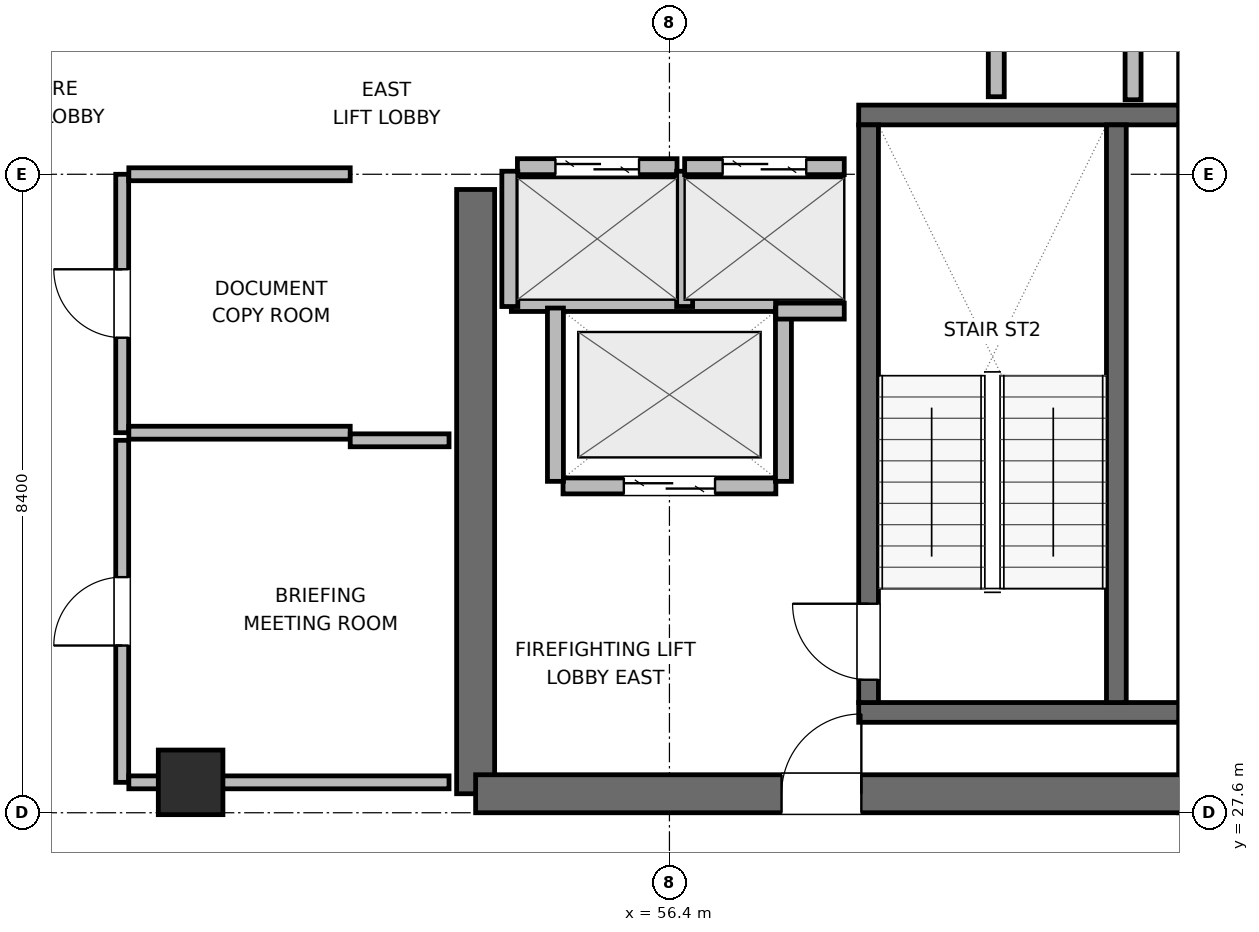
"""IFC4 building model, lengths in metres.
Left out: names, types, materials, properties, quantities, classifications, styles, units other than length and angle.
Written with IfcOpenShell. Run it as: python <this file> out.ifc"""

import sys

from ifc_helpers import new_model, si_unit, direction, frame, frame_2d, origin, origin_2d, place, context, subcontext, project, spatial, rectangle, extrude, element, fill, save


model = new_model("IFC4")
c1 = context("Model", 3, precision=1e-05, world=origin(), true_north=direction((0.0, 1.0)))
c2 = subcontext(c1, "Body", "Model", "MODEL_VIEW")
j1 = project(units=[si_unit("LENGTHUNIT", "METRE"), si_unit("PLANEANGLEUNIT", "RADIAN")], contexts=[c1])
p1 = place(None, origin())
s1 = spatial("IfcSite", under=j1, at=p1, CompositionType="ELEMENT")
p2 = place(p1, origin())
s2 = spatial("IfcBuilding", under=s1, at=p2, CompositionType="ELEMENT")
p3 = place(p2, frame((0.0, 0.0, 302.4)))
s3 = spatial("IfcBuildingStorey", under=s2, at=p3, CompositionType="ELEMENT", Elevation=302.4)
p4 = place(p3, frame((53.85, 27.85, 0.0), z_axis=(0.0, 0.0, 1.0), x_axis=(0.0, 1.0, 0.0)))
e1 = element("IfcWall", 1, at=p4, inside=s3, PredefinedType="SHEAR", context=c2, shape_type="SweptSolid", body=[
    extrude(rectangle(XDim=7.95, YDim=0.5, at=frame_2d((3.975, 0.0))), origin(), (0.0, 0.0, 1.0), 3.9),
])
p5 = place(p3, frame((63.35, 27.6, 0.0), z_axis=(0.0, 0.0, 1.0), x_axis=(0.0, 1.0, 0.0)))
e2 = element("IfcWall", 2, at=p5, inside=s3, PredefinedType="SHEAR", context=c2, shape_type="SweptSolid", body=[
    extrude(rectangle(XDim=16.8, YDim=0.5, at=frame_2d((8.4, 0.0))), origin(), (0.0, 0.0, 1.0), 3.9),
])
p6 = place(p3, frame((53.85, 27.85, 0.0), z_axis=(0.0, 0.0, 1.0), x_axis=(1.0, 0.0, 0.0)))
e3 = element("IfcWall", 3, at=p6, inside=s3, PredefinedType="SHEAR", context=c2, shape_type="SweptSolid", body=[
    extrude(rectangle(XDim=9.5, YDim=0.5, at=frame_2d((4.75, 0.0))), origin(), (0.0, 0.0, 1.0), 3.9),
])
p7 = place(p6, frame((4.025, 0.0, 0.0)))
e4 = element("IfcOpeningElement", 4, at=p7, cuts=e3, PredefinedType="OPENING", context=c2, shape_type="SweptSolid", body=[
    extrude(rectangle(XDim=1.05, YDim=2.04, at=frame_2d((0.525, 1.02))), frame((0.0, 0.26, 0.0), z_axis=(0.0, -1.0, 0.0), x_axis=(1.0, 0.0, 0.0)), (0.0, 0.0, 1.0), 0.52),
])
for number, where, z_axis, x_axis in (
    (5, (58.89, 28.92, 0.0), (0.0, 0.0, 1.0), (1.0, 0.0, 0.0)),
    (6, (58.89, 36.78, 0.0), (0.0, 0.0, 1.0), (1.0, 0.0, 0.0)),
):
    element("IfcWall", number, at=place(p3, frame(where, z_axis=z_axis, x_axis=x_axis)), inside=s3, PredefinedType="SHEAR", context=c2, shape_type="SweptSolid", body=[
        extrude(rectangle(XDim=4.21, YDim=0.26, at=frame_2d((2.105, 0.0))), origin(), (0.0, 0.0, 1.0), 3.9),
    ])
p8 = place(p3, frame((59.02, 29.05, 0.0), z_axis=(0.0, 0.0, 1.0), x_axis=(0.0, 1.0, 0.0)))
e7 = element("IfcWall", 7, at=p8, inside=s3, PredefinedType="SHEAR", context=c2, shape_type="SweptSolid", body=[
    extrude(rectangle(XDim=7.6, YDim=0.26, at=frame_2d((3.8, 0.0))), origin(), (0.0, 0.0, 1.0), 3.9),
])
p9 = place(p8, frame((0.3, 0.0, 0.0)))
e8 = element("IfcOpeningElement", 8, at=p9, cuts=e7, PredefinedType="OPENING", context=c2, shape_type="SweptSolid", body=[
    extrude(rectangle(XDim=1.0, YDim=2.04, at=frame_2d((0.5, 1.02))), frame((0.0, 0.14, 0.0), z_axis=(0.0, -1.0, 0.0), x_axis=(1.0, 0.0, 0.0)), (0.0, 0.0, 1.0), 0.28),
])
p10 = place(p3, frame((62.28, 29.05, 0.0), z_axis=(0.0, 0.0, 1.0), x_axis=(0.0, 1.0, 0.0)))
e9 = element("IfcWall", 9, at=p10, inside=s3, PredefinedType="SHEAR", context=c2, shape_type="SweptSolid", body=[
    extrude(rectangle(XDim=7.6, YDim=0.26, at=frame_2d((3.8, 0.0))), origin(), (0.0, 0.0, 1.0), 3.9),
])
p11 = place(p3, frame((50.1, 28.0, 0.0), z_axis=(0.0, 0.0, 1.0), x_axis=(1.0, 0.0, 0.0)))
e10 = element("IfcColumn", 10, at=p11, inside=s3, PredefinedType="COLUMN", context=c2, shape_type="SweptSolid", body=[
    extrude(rectangle(XDim=0.85, YDim=0.85, at=origin_2d()), origin(), (0.0, 0.0, 1.0), 3.9),
])
p12 = place(p3, frame((60.7, 37.02, 0.0), z_axis=(0.0, 0.0, 1.0), x_axis=(0.0, 1.0, 0.0)))
e11 = element("IfcWall", 11, at=p12, inside=s3, PredefinedType="PARTITIONING", context=c2, shape_type="SweptSolid", body=[
    extrude(rectangle(XDim=1.96, YDim=0.21, at=frame_2d((0.98, 0.0))), origin(), (0.0, 0.0, 1.0), 3.68),
])
p13 = place(p3, frame((62.5, 36.98, 0.0), z_axis=(0.0, 0.0, 1.0), x_axis=(0.0, 1.0, 0.0)))
e12 = element("IfcWall", 12, at=p13, inside=s3, PredefinedType="PARTITIONING", context=c2, shape_type="SweptSolid", body=[
    extrude(rectangle(XDim=2.04, YDim=0.21, at=frame_2d((1.02, 0.0))), origin(), (0.0, 0.0, 1.0), 3.68),
])
p14 = place(p3, frame((55.0, 31.9, 0.0), z_axis=(0.0, 0.0, 1.0), x_axis=(1.0, 0.0, 0.0)))
e13 = element("IfcWall", 13, at=p14, inside=s3, PredefinedType="PARTITIONING", context=c2, shape_type="SweptSolid", body=[
    extrude(rectangle(XDim=2.8, YDim=0.21, at=frame_2d((1.4, 0.0))), origin(), (0.0, 0.0, 1.0), 3.68),
])
p15 = place(p14, frame((0.8, 0.0, 0.0)))
e14 = element("IfcOpeningElement", 14, at=p15, cuts=e13, PredefinedType="OPENING", context=c2, shape_type="SweptSolid", body=[
    extrude(rectangle(XDim=1.2, YDim=2.04, at=frame_2d((0.6, 1.02))), frame((0.0, 0.115, 0.0), z_axis=(0.0, -1.0, 0.0), x_axis=(1.0, 0.0, 0.0)), (0.0, 0.0, 1.0), 0.23),
])
p16 = place(p3, frame((54.32, 34.3, 0.0), z_axis=(0.0, 0.0, 1.0), x_axis=(1.0, 0.0, 0.0)))
e15 = element("IfcWall", 15, at=p16, inside=s3, PredefinedType="PARTITIONING", context=c2, shape_type="SweptSolid", body=[
    extrude(rectangle(XDim=3.48, YDim=0.21, at=frame_2d((1.74, 0.0))), origin(), (0.0, 0.0, 1.0), 3.68),
])
for number, where, z_axis, x_axis in (
    (16, (54.9, 31.96, 0.0), (0.0, 0.0, 1.0), (0.0, 1.0, 0.0)),
    (17, (57.9, 31.96, 0.0), (0.0, 0.0, 1.0), (0.0, 1.0, 0.0)),
):
    element("IfcWall", number, at=place(p3, frame(where, z_axis=z_axis, x_axis=x_axis)), inside=s3, PredefinedType="PARTITIONING", context=c2, shape_type="SweptSolid", body=[
        extrude(rectangle(XDim=2.28, YDim=0.21, at=frame_2d((1.14, 0.0))), origin(), (0.0, 0.0, 1.0), 3.68),
    ])
p17 = place(p3, frame((54.4, 36.1, 0.0), z_axis=(0.0, 0.0, 1.0), x_axis=(1.0, 0.0, 0.0)))
e18 = element("IfcWall", 18, at=p17, inside=s3, PredefinedType="PARTITIONING", context=c2, shape_type="SweptSolid", body=[
    extrude(rectangle(XDim=2.1, YDim=0.21, at=frame_2d((1.05, 0.0))), origin(), (0.0, 0.0, 1.0), 3.68),
])
p18 = place(p17, frame((0.5, 0.0, 0.0)))
e19 = element("IfcOpeningElement", 19, at=p18, cuts=e18, PredefinedType="OPENING", context=c2, shape_type="SweptSolid", body=[
    extrude(rectangle(XDim=1.1, YDim=2.04, at=frame_2d((0.55, 1.02))), frame((0.0, 0.115, 0.0), z_axis=(0.0, -1.0, 0.0), x_axis=(1.0, 0.0, 0.0)), (0.0, 0.0, 1.0), 0.23),
])
for number, where, z_axis, x_axis in (
    (20, (54.3, 34.26, 0.0), (0.0, 0.0, 1.0), (0.0, 1.0, 0.0)),
    (21, (56.6, 34.26, 0.0), (0.0, 0.0, 1.0), (0.0, 1.0, 0.0)),
):
    element("IfcWall", number, at=place(p3, frame(where, z_axis=z_axis, x_axis=x_axis)), inside=s3, PredefinedType="PARTITIONING", context=c2, shape_type="SweptSolid", body=[
        extrude(rectangle(XDim=1.78, YDim=0.21, at=frame_2d((0.89, 0.0))), origin(), (0.0, 0.0, 1.0), 3.68),
    ])
p19 = place(p3, frame((56.6, 36.1, 0.0), z_axis=(0.0, 0.0, 1.0), x_axis=(1.0, 0.0, 0.0)))
e22 = element("IfcWall", 22, at=p19, inside=s3, PredefinedType="PARTITIONING", context=c2, shape_type="SweptSolid", body=[
    extrude(rectangle(XDim=2.1, YDim=0.21, at=frame_2d((1.05, 0.0))), origin(), (0.0, 0.0, 1.0), 3.68),
])
p20 = place(p19, frame((0.5, 0.0, 0.0)))
e23 = element("IfcOpeningElement", 23, at=p20, cuts=e22, PredefinedType="OPENING", context=c2, shape_type="SweptSolid", body=[
    extrude(rectangle(XDim=1.1, YDim=2.04, at=frame_2d((0.55, 1.02))), frame((0.0, 0.115, 0.0), z_axis=(0.0, -1.0, 0.0), x_axis=(1.0, 0.0, 0.0)), (0.0, 0.0, 1.0), 0.23),
])
p21 = place(p3, frame((57.8, 34.2, 0.0), z_axis=(0.0, 0.0, 1.0), x_axis=(1.0, 0.0, 0.0)))
e24 = element("IfcWall", 24, at=p21, inside=s3, PredefinedType="PARTITIONING", context=c2, shape_type="SweptSolid", body=[
    extrude(rectangle(XDim=0.9, YDim=0.21, at=frame_2d((0.45, 0.0))), origin(), (0.0, 0.0, 1.0), 3.68),
])
p22 = place(p3, frame((49.2, 32.6, 0.0), z_axis=(0.0, 0.0, 1.0), x_axis=(0.0, 1.0, 0.0)))
e25 = element("IfcWall", 25, at=p22, inside=s3, PredefinedType="PARTITIONING", context=c2, shape_type="SweptSolid", body=[
    extrude(rectangle(XDim=3.4, YDim=0.17, at=frame_2d((1.7, 0.0))), origin(), (0.0, 0.0, 1.0), 3.68),
])
p23 = place(p22, frame((1.25, 0.0, 0.0)))
e26 = element("IfcOpeningElement", 26, at=p23, cuts=e25, PredefinedType="OPENING", context=c2, shape_type="SweptSolid", body=[
    extrude(rectangle(XDim=0.9, YDim=2.02, at=frame_2d((0.45, 1.01))), frame((0.0, 0.095, 0.0), z_axis=(0.0, -1.0, 0.0), x_axis=(1.0, 0.0, 0.0)), (0.0, 0.0, 1.0), 0.19),
])
for number, where, z_axis, x_axis in (
    (27, (49.287, 32.6, 0.0), (0.0, 0.0, 1.0), (1.0, 0.0, 0.0)),
    (28, (49.287, 36.0, 0.0), (0.0, 0.0, 1.0), (1.0, 0.0, 0.0)),
):
    element("IfcWall", number, at=place(p3, frame(where, z_axis=z_axis, x_axis=x_axis)), inside=s3, PredefinedType="PARTITIONING", context=c2, shape_type="SweptSolid", body=[
        extrude(rectangle(XDim=2.913, YDim=0.17, at=frame_2d((1.457, 0.0))), origin(), (0.0, 0.0, 1.0), 3.68),
    ])
p24 = place(p3, frame((49.2, 28.0, 0.0), z_axis=(0.0, 0.0, 1.0), x_axis=(0.0, 1.0, 0.0)))
e29 = element("IfcWall", 29, at=p24, inside=s3, PredefinedType="PARTITIONING", context=c2, shape_type="SweptSolid", body=[
    extrude(rectangle(XDim=4.5, YDim=0.17, at=frame_2d((2.25, 0.0))), origin(), (0.0, 0.0, 1.0), 3.68),
])
p25 = place(p24, frame((1.8, 0.0, 0.0)))
e30 = element("IfcOpeningElement", 30, at=p25, cuts=e29, PredefinedType="OPENING", context=c2, shape_type="SweptSolid", body=[
    extrude(rectangle(XDim=0.9, YDim=2.02, at=frame_2d((0.45, 1.01))), frame((0.0, 0.095, 0.0), z_axis=(0.0, -1.0, 0.0), x_axis=(1.0, 0.0, 0.0)), (0.0, 0.0, 1.0), 0.19),
])
p26 = place(p3, frame((49.287, 28.0, 0.0), z_axis=(0.0, 0.0, 1.0), x_axis=(1.0, 0.0, 0.0)))
e31 = element("IfcWall", 31, at=p26, inside=s3, PredefinedType="PARTITIONING", context=c2, shape_type="SweptSolid", body=[
    extrude(rectangle(XDim=4.213, YDim=0.17, at=frame_2d((2.106, 0.0))), origin(), (0.0, 0.0, 1.0), 2.765),
])
p27 = place(p3, frame((52.2, 32.5, 0.0), z_axis=(0.0, 0.0, 1.0), x_axis=(1.0, 0.0, 0.0)))
e32 = element("IfcWall", 32, at=p27, inside=s3, PredefinedType="PARTITIONING", context=c2, shape_type="SweptSolid", body=[
    extrude(rectangle(XDim=1.3, YDim=0.17, at=frame_2d((0.65, 0.0))), origin(), (0.0, 0.0, 1.0), 3.68),
])
p28 = place(p9, origin())
e33 = element("IfcDoor", 33, at=p28, inside=s3, OperationType="SINGLE_SWING_RIGHT", PredefinedType="DOOR", context=c2, shape_type="SweptSolid", body=[
    extrude(rectangle(XDim=1.0, YDim=2.04, at=frame_2d((0.5, 1.02))), frame((0.0, 0.025, 0.0), z_axis=(0.0, -1.0, 0.0), x_axis=(1.0, 0.0, 0.0)), (0.0, 0.0, 1.0), 0.05),
])
fill(e8, e33)
p29 = place(p15, origin())
e34 = element("IfcDoor", 34, at=p29, inside=s3, OperationType="DOUBLE_DOOR_SLIDING", PredefinedType="DOOR", context=c2, shape_type="SweptSolid", body=[
    extrude(rectangle(XDim=1.2, YDim=2.04, at=frame_2d((0.6, 1.02))), frame((0.0, 0.025, 0.0), z_axis=(0.0, -1.0, 0.0), x_axis=(1.0, 0.0, 0.0)), (0.0, 0.0, 1.0), 0.05),
])
fill(e14, e34)
p30 = place(p18, origin())
e35 = element("IfcDoor", 35, at=p30, inside=s3, OperationType="DOUBLE_DOOR_SLIDING", PredefinedType="DOOR", context=c2, shape_type="SweptSolid", body=[
    extrude(rectangle(XDim=1.1, YDim=2.04, at=frame_2d((0.55, 1.02))), frame((0.0, 0.025, 0.0), z_axis=(0.0, -1.0, 0.0), x_axis=(1.0, 0.0, 0.0)), (0.0, 0.0, 1.0), 0.05),
])
fill(e19, e35)
p31 = place(p20, origin())
e36 = element("IfcDoor", 36, at=p31, inside=s3, OperationType="DOUBLE_DOOR_SLIDING", PredefinedType="DOOR", context=c2, shape_type="SweptSolid", body=[
    extrude(rectangle(XDim=1.1, YDim=2.04, at=frame_2d((0.55, 1.02))), frame((0.0, 0.025, 0.0), z_axis=(0.0, -1.0, 0.0), x_axis=(1.0, 0.0, 0.0)), (0.0, 0.0, 1.0), 0.05),
])
fill(e23, e36)
p32 = place(p7, origin())
e37 = element("IfcDoor", 37, at=p32, inside=s3, OperationType="SINGLE_SWING_RIGHT", PredefinedType="DOOR", context=c2, shape_type="SweptSolid", body=[
    extrude(rectangle(XDim=1.05, YDim=2.04, at=frame_2d((0.525, 1.02))), frame((0.0, 0.025, 0.0), z_axis=(0.0, -1.0, 0.0), x_axis=(1.0, 0.0, 0.0)), (0.0, 0.0, 1.0), 0.05),
])
fill(e4, e37)
p33 = place(p23, origin())
e38 = element("IfcDoor", 38, at=p33, inside=s3, OperationType="SINGLE_SWING_RIGHT", PredefinedType="DOOR", context=c2, shape_type="SweptSolid", body=[
    extrude(rectangle(XDim=0.9, YDim=2.02, at=frame_2d((0.45, 1.01))), frame((0.0, 0.025, 0.0), z_axis=(0.0, -1.0, 0.0), x_axis=(1.0, 0.0, 0.0)), (0.0, 0.0, 1.0), 0.05),
])
fill(e26, e38)
p34 = place(p25, origin())
e39 = element("IfcDoor", 39, at=p34, inside=s3, OperationType="SINGLE_SWING_LEFT", PredefinedType="DOOR", context=c2, shape_type="SweptSolid", body=[
    extrude(rectangle(XDim=0.9, YDim=2.02, at=frame_2d((0.45, 1.01))), frame((0.0, 0.025, 0.0), z_axis=(0.0, -1.0, 0.0), x_axis=(1.0, 0.0, 0.0)), (0.0, 0.0, 1.0), 0.05),
])
fill(e30, e39)
save(model, sys.argv[1])
